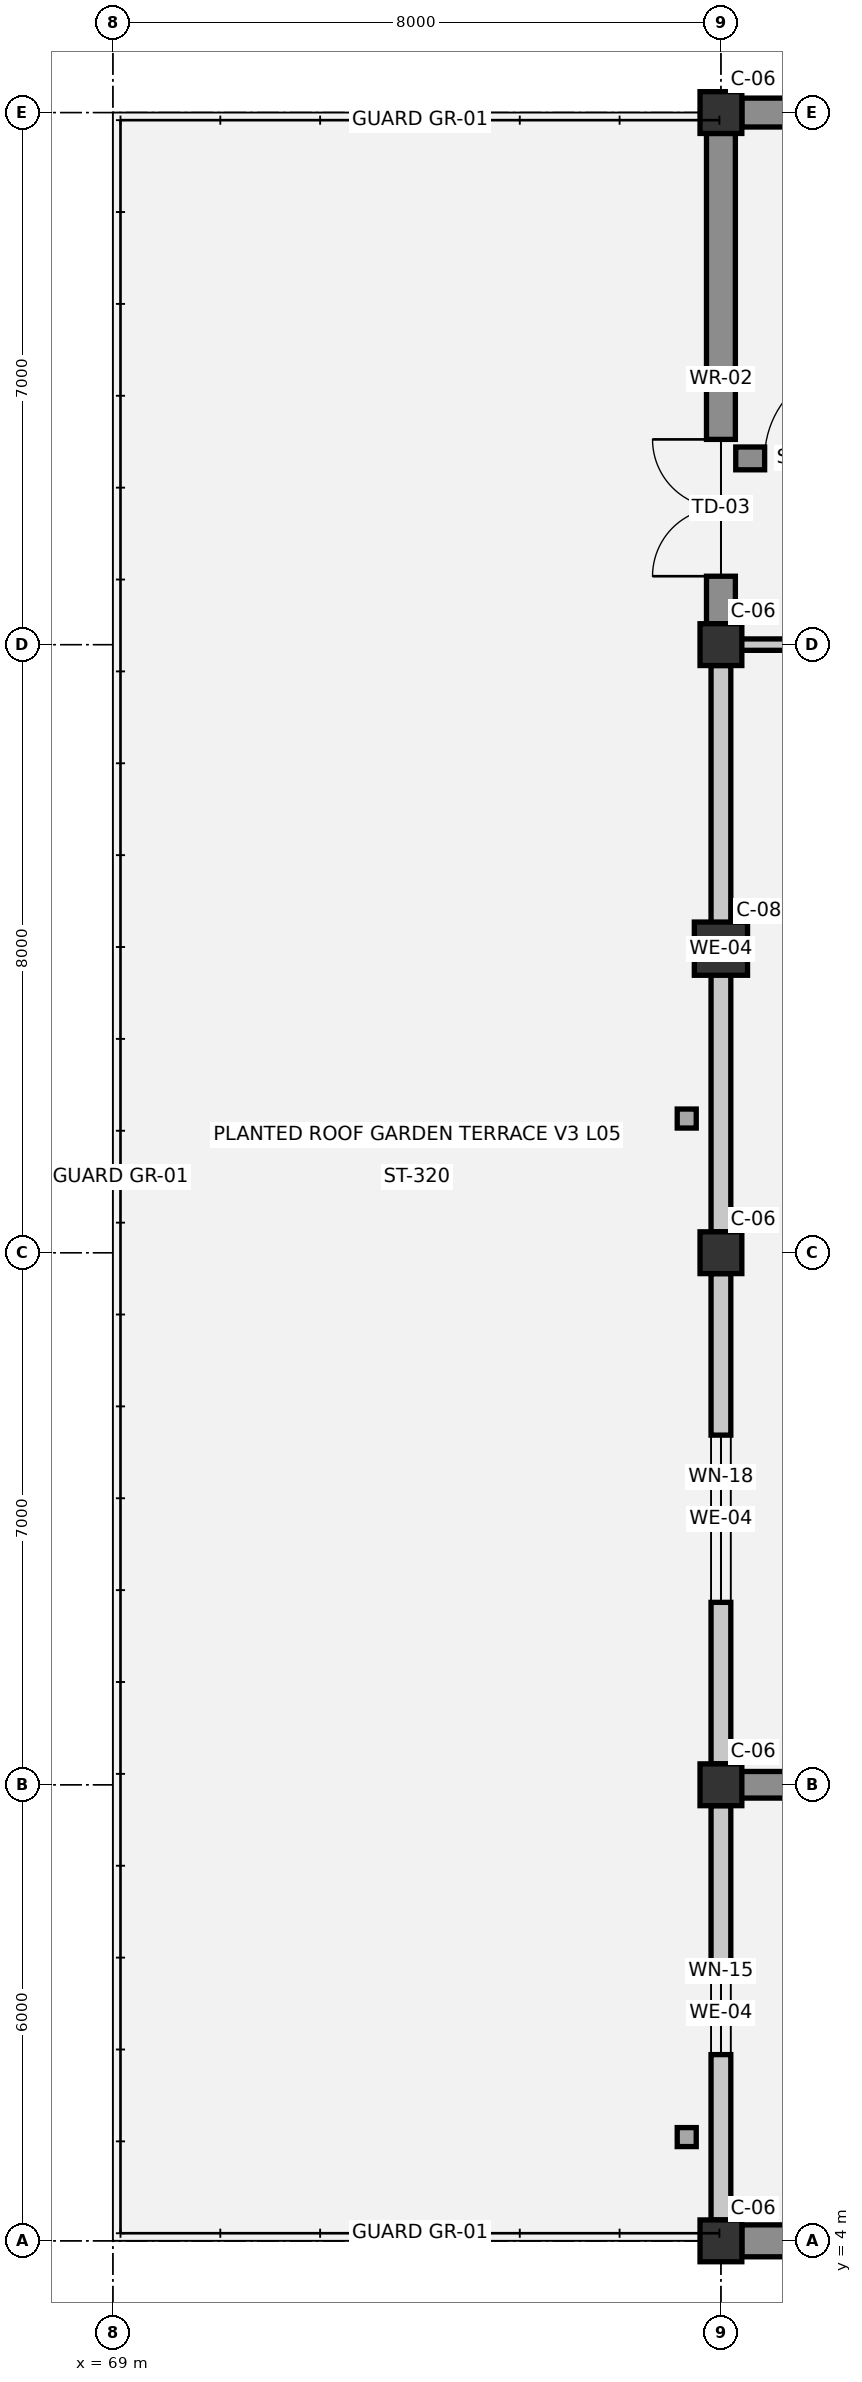
"""IFC4 building model, lengths in metres.
Left out: names, types, materials, properties, quantities, classifications, styles, units other than length and angle.
Written with IfcOpenShell. Run it as: python <this file> out.ifc"""

import sys

from ifc_helpers import new_model, si_unit, direction, frame, frame_2d, origin, origin_2d, place, context, subcontext, project, spatial, rectangle, circle, extrude, element, fill, save


model = new_model("IFC4")
c1 = context("Model", 3, precision=1e-05, world=origin(), true_north=direction((0.0, 1.0)))
c2 = subcontext(c1, "Body", "Model", "MODEL_VIEW")
j1 = project(units=[si_unit("LENGTHUNIT", "METRE"), si_unit("PLANEANGLEUNIT", "RADIAN")], contexts=[c1])
p1 = place(None, origin())
s1 = spatial("IfcSite", under=j1, at=p1, CompositionType="ELEMENT")
p2 = place(p1, origin())
s2 = spatial("IfcBuilding", under=s1, at=p2, CompositionType="ELEMENT")
p3 = place(p2, frame((0.0, 0.0, 18.3)))
s3 = spatial("IfcBuildingStorey", under=s2, at=p3, CompositionType="ELEMENT", Elevation=18.3)
for number, where, z_axis, x_axis in (
    (1, (77.0, 4.0, 0.0), (0.0, 0.0, 1.0), (1.0, 0.0, 0.0)),
    (2, (77.0, 10.0, 0.0), (0.0, 0.0, 1.0), (1.0, 0.0, 0.0)),
    (3, (77.0, 17.0, 0.0), (0.0, 0.0, 1.0), (1.0, 0.0, 0.0)),
    (4, (77.0, 25.0, 0.0), (0.0, 0.0, 1.0), (1.0, 0.0, 0.0)),
    (5, (77.0, 32.0, 0.0), (0.0, 0.0, 1.0), (1.0, 0.0, 0.0)),
):
    element("IfcColumn", number, at=place(p3, frame(where, z_axis=z_axis, x_axis=x_axis)), inside=s3, PredefinedType="COLUMN", context=c2, shape_type="SweptSolid", body=[
        extrude(rectangle(XDim=0.55, YDim=0.55, at=origin_2d()), origin(), (0.0, 0.0, 1.0), 3.75),
    ])
p4 = place(p3, frame((77.0, 21.0, 0.0), z_axis=(0.0, 0.0, 1.0), x_axis=(1.0, 0.0, 0.0)))
e6 = element("IfcColumn", 6, at=p4, inside=s3, PredefinedType="COLUMN", context=c2, shape_type="SweptSolid", body=[
    extrude(circle(Radius=0.35, at=origin_2d()), origin(), (0.0, 0.0, 1.0), 3.75),
])
p5 = place(p3, frame((77.0, 4.275, 0.0), z_axis=(0.0, 0.0, 1.0), x_axis=(0.0, 1.0, 0.0)))
e7 = element("IfcWall", 7, at=p5, inside=s3, PredefinedType="SOLIDWALL", context=c2, shape_type="SweptSolid", body=[
    extrude(rectangle(XDim=5.45, YDim=0.26, at=frame_2d((2.725, 0.0))), origin(), (0.0, 0.0, 1.0), 2.69),
])
p6 = place(p5, frame((2.175, 0.0, 0.9)))
e8 = element("IfcOpeningElement", 8, at=p6, cuts=e7, PredefinedType="OPENING", context=c2, shape_type="SweptSolid", body=[
    extrude(rectangle(XDim=1.1, YDim=1.2, at=frame_2d((0.55, 0.6))), frame((0.0, 0.14, 0.0), z_axis=(0.0, -1.0, 0.0), x_axis=(1.0, 0.0, 0.0)), (0.0, 0.0, 1.0), 0.28),
])
p7 = place(p3, frame((77.0, 10.275, 0.0), z_axis=(0.0, 0.0, 1.0), x_axis=(0.0, 1.0, 0.0)))
e9 = element("IfcWall", 9, at=p7, inside=s3, PredefinedType="SOLIDWALL", context=c2, shape_type="SweptSolid", body=[
    extrude(rectangle(XDim=6.45, YDim=0.26, at=frame_2d((3.225, 0.0))), origin(), (0.0, 0.0, 1.0), 2.69),
])
p8 = place(p7, frame((2.125, 0.0, 0.9)))
e10 = element("IfcOpeningElement", 10, at=p8, cuts=e9, PredefinedType="OPENING", context=c2, shape_type="SweptSolid", body=[
    extrude(rectangle(XDim=2.2, YDim=1.0, at=frame_2d((1.1, 0.5))), frame((0.0, 0.14, 0.0), z_axis=(0.0, -1.0, 0.0), x_axis=(1.0, 0.0, 0.0)), (0.0, 0.0, 1.0), 0.28),
])
p9 = place(p3, frame((77.0, 17.275, 0.0), z_axis=(0.0, 0.0, 1.0), x_axis=(0.0, 1.0, 0.0)))
e11 = element("IfcWall", 11, at=p9, inside=s3, PredefinedType="SOLIDWALL", context=c2, shape_type="SweptSolid", body=[
    extrude(rectangle(XDim=7.45, YDim=0.26, at=frame_2d((3.725, 0.0))), origin(), (0.0, 0.0, 1.0), 2.69),
])
p10 = place(p3, frame((77.0, 25.275, 0.0), z_axis=(0.0, 0.0, 1.0), x_axis=(0.0, 1.0, 0.0)))
e12 = element("IfcWall", 12, at=p10, inside=s3, PredefinedType="STANDARD", context=c2, shape_type="SweptSolid", body=[
    extrude(rectangle(XDim=6.45, YDim=0.38, at=frame_2d((3.225, 0.0))), origin(), (0.0, 0.0, 1.0), 2.69),
])
p11 = place(p10, frame((0.625, 0.0, 0.0)))
e13 = element("IfcOpeningElement", 13, at=p11, cuts=e12, PredefinedType="OPENING", context=c2, shape_type="SweptSolid", body=[
    extrude(rectangle(XDim=1.8, YDim=2.2, at=frame_2d((0.9, 1.1))), frame((0.0, 0.2, 0.0), z_axis=(0.0, -1.0, 0.0), x_axis=(1.0, 0.0, 0.0)), (0.0, 0.0, 1.0), 0.4),
])
p12 = place(p3, frame((77.275, 32.0, 0.0), z_axis=(0.0, 0.0, 1.0), x_axis=(1.0, 0.0, 0.0)))
e14 = element("IfcWall", 14, at=p12, inside=s3, PredefinedType="STANDARD", context=c2, shape_type="SweptSolid", body=[
    extrude(rectangle(XDim=7.45, YDim=0.38, at=frame_2d((3.725, 0.0))), origin(), (0.0, 0.0, 1.0), 2.69),
])
p13 = place(p3, frame((84.725, 4.0, 0.0), z_axis=(0.0, 0.0, 1.0), x_axis=(-1.0, 0.0, 0.0)))
e15 = element("IfcWall", 15, at=p13, inside=s3, PredefinedType="SOLIDWALL", context=c2, shape_type="SweptSolid", body=[
    extrude(rectangle(XDim=7.45, YDim=0.42, at=frame_2d((3.725, 0.0))), origin(), (0.0, 0.0, 1.0), 2.69),
])
p14 = place(p13, frame((3.175, 0.0, 0.9)))
e16 = element("IfcOpeningElement", 16, at=p14, cuts=e15, PredefinedType="OPENING", context=c2, shape_type="SweptSolid", body=[
    extrude(rectangle(XDim=1.1, YDim=1.2, at=frame_2d((0.55, 0.6))), frame((0.0, 0.22, 0.0), z_axis=(0.0, -1.0, 0.0), x_axis=(1.0, 0.0, 0.0)), (0.0, 0.0, 1.0), 0.44),
])
p15 = place(p3, frame((77.195, 27.45, 0.0), z_axis=(0.0, 0.0, 1.0), x_axis=(1.0, 0.0, 0.0)))
e17 = element("IfcWall", 17, at=p15, inside=s3, PredefinedType="SHEAR", context=c2, shape_type="SweptSolid", body=[
    extrude(rectangle(XDim=7.655, YDim=0.3, at=frame_2d((3.828, 0.0))), origin(), (0.0, 0.0, 1.0), 3.41),
])
p16 = place(p15, frame((0.38, 0.0, 0.0)))
e18 = element("IfcOpeningElement", 18, at=p16, cuts=e17, PredefinedType="OPENING", context=c2, shape_type="SweptSolid", body=[
    extrude(rectangle(XDim=1.25, YDim=2.15, at=frame_2d((0.625, 1.075))), frame((0.0, 0.16, 0.0), z_axis=(0.0, -1.0, 0.0), x_axis=(1.0, 0.0, 0.0)), (0.0, 0.0, 1.0), 0.32),
])
p17 = place(p3, frame((77.08, 10.0, 0.0), z_axis=(0.0, 0.0, 1.0), x_axis=(1.0, 0.0, 0.0)))
e19 = element("IfcWall", 19, at=p17, inside=s3, PredefinedType="SHEAR", context=c2, shape_type="SweptSolid", body=[
    extrude(rectangle(XDim=5.24, YDim=0.35, at=frame_2d((2.62, 0.0))), origin(), (0.0, 0.0, 1.0), 3.39),
])
p18 = place(p3, frame((77.08, 25.0, 0.0), z_axis=(0.0, 0.0, 1.0), x_axis=(1.0, 0.0, 0.0)))
e20 = element("IfcWall", 20, at=p18, inside=s3, PredefinedType="PARTITIONING", context=c2, shape_type="SweptSolid", body=[
    extrude(rectangle(XDim=5.24, YDim=0.15, at=frame_2d((2.62, 0.0))), origin(), (0.0, 0.0, 1.0), 2.81),
])
p19 = place(p6, origin())
e21 = element("IfcWindow", 21, at=p19, inside=s3, PartitioningType="SINGLE_PANEL", PredefinedType="WINDOW", context=c2, shape_type="SweptSolid", body=[
    extrude(rectangle(XDim=1.1, YDim=1.2, at=frame_2d((0.55, 0.6))), frame((0.0, 0.03, 0.0), z_axis=(0.0, -1.0, 0.0), x_axis=(1.0, 0.0, 0.0)), (0.0, 0.0, 1.0), 0.06),
])
fill(e8, e21)
p20 = place(p8, origin())
e22 = element("IfcWindow", 22, at=p20, inside=s3, PartitioningType="SINGLE_PANEL", PredefinedType="WINDOW", context=c2, shape_type="SweptSolid", body=[
    extrude(rectangle(XDim=2.2, YDim=1.0, at=frame_2d((1.1, 0.5))), frame((0.0, 0.03, 0.0), z_axis=(0.0, -1.0, 0.0), x_axis=(1.0, 0.0, 0.0)), (0.0, 0.0, 1.0), 0.06),
])
fill(e10, e22)
p21 = place(p11, origin())
e23 = element("IfcDoor", 23, at=p21, inside=s3, OperationType="DOUBLE_DOOR_SINGLE_SWING", PredefinedType="DOOR", context=c2, shape_type="SweptSolid", body=[
    extrude(rectangle(XDim=1.8, YDim=2.2, at=frame_2d((0.9, 1.1))), frame((0.0, 0.025, 0.0), z_axis=(0.0, -1.0, 0.0), x_axis=(1.0, 0.0, 0.0)), (0.0, 0.0, 1.0), 0.05),
])
fill(e13, e23)
p22 = place(p16, origin())
e24 = element("IfcDoor", 24, at=p22, inside=s3, OperationType="SINGLE_SWING_RIGHT", PredefinedType="DOOR", context=c2, shape_type="SweptSolid", body=[
    extrude(rectangle(XDim=1.25, YDim=2.15, at=frame_2d((0.625, 1.075))), frame((0.0, 0.025, 0.0), z_axis=(0.0, -1.0, 0.0), x_axis=(1.0, 0.0, 0.0)), (0.0, 0.0, 1.0), 0.05),
])
fill(e18, e24)
save(model, sys.argv[1])
